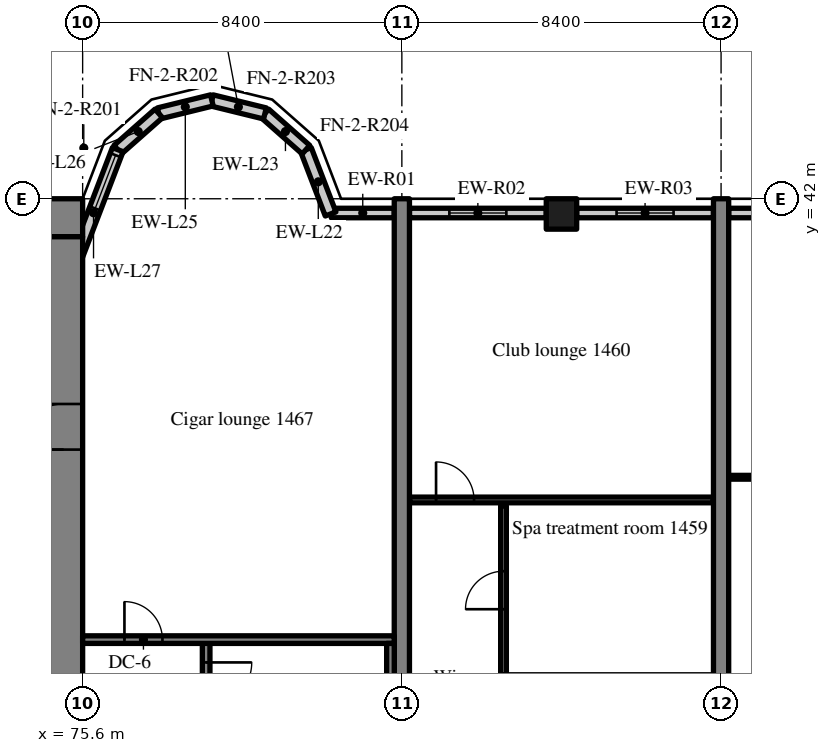
"""IFC4 building model, lengths in metres.
Left out: names, types, materials, properties, quantities, classifications, styles, units other than length and angle.
Written with IfcOpenShell. Run it as: python <this file> out.ifc"""

import sys

from ifc_helpers import new_model, si_unit, direction, frame, frame_2d, origin, origin_2d, place, context, subcontext, project, spatial, rectangle, extrude, source, transform, mapped, element, fill, save


model = new_model("IFC4")
c1 = context("Model", 3, precision=1e-05, world=origin(), true_north=direction((0.0, 1.0)))
c2 = subcontext(c1, "Body", "Model", "MODEL_VIEW")
j1 = project(units=[si_unit("LENGTHUNIT", "METRE"), si_unit("PLANEANGLEUNIT", "RADIAN")], contexts=[c1])
p1 = place(None, origin())
s1 = spatial("IfcSite", under=j1, at=p1, CompositionType="ELEMENT")
p2 = place(p1, origin())
s2 = spatial("IfcBuilding", under=s1, at=p2, CompositionType="ELEMENT")
p3 = place(p2, frame((0.0, 0.0, 62.0)))
s3 = spatial("IfcBuildingStorey", under=s2, at=p3, CompositionType="ELEMENT", Elevation=62.0)
m1 = source(origin(), c2, "Body", "SweptSolid", [
    extrude(rectangle(XDim=50.4, YDim=1.0, at=frame_2d((25.2, 0.0))), origin(), (0.0, 0.0, 1.0), 3.52),
])
p4 = place(p3, frame((25.2, 41.5, 0.0), z_axis=(0.0, 0.0, 1.0), x_axis=(1.0, 0.0, 0.0)))
e1 = element("IfcWall", 1, at=p4, inside=s3, PredefinedType="SHEAR", context=c2, shape_type="MappedRepresentation", body=[
    mapped(m1, transform((0.0, 0.0, 0.0), scale=1.0)),
])
m2 = source(origin(), c2, "Body", "SweptSolid", [
    extrude(rectangle(XDim=18.0, YDim=1.0, at=frame_2d((9.0, 0.0))), origin(), (0.0, 0.0, 1.0), 3.52),
])
p5 = place(p3, frame((75.1, 23.0, 0.0), z_axis=(0.0, 0.0, 1.0), x_axis=(0.0, 1.0, 0.0)))
e2 = element("IfcWall", 2, at=p5, inside=s3, PredefinedType="SHEAR", context=c2, shape_type="MappedRepresentation", body=[
    mapped(m2, transform((0.0, 0.0, 0.0), scale=1.0)),
])
m3 = source(origin(), c2, "Body", "SweptSolid", [
    extrude(rectangle(XDim=1.2, YDim=2.1, at=frame_2d((0.6, 1.05))), frame((0.0, 0.51, 0.0), z_axis=(0.0, -1.0, 0.0), x_axis=(1.0, 0.0, 0.0)), (0.0, 0.0, 1.0), 1.02),
])
p6 = place(p5, frame((12.4, 0.0, 0.0)))
e3 = element("IfcOpeningElement", 3, at=p6, cuts=e2, PredefinedType="OPENING", context=c2, shape_type="MappedRepresentation", body=[
    mapped(m3, transform((0.0, 0.0, 0.0), scale=1.0)),
])
m4 = source(origin(), c2, "Body", "SweptSolid", [
    extrude(rectangle(XDim=20.0, YDim=0.4, at=frame_2d((10.0, 0.0))), origin(), (0.0, 0.0, 1.0), 3.52),
])
for number, where, z_axis, x_axis in (
    (4, (84.0, 22.0, 0.0), (0.0, 0.0, 1.0), (0.0, 1.0, 0.0)),
    (5, (92.4, 22.0, 0.0), (0.0, 0.0, 1.0), (0.0, 1.0, 0.0)),
):
    element("IfcWall", number, at=place(p3, frame(where, z_axis=z_axis, x_axis=x_axis)), inside=s3, PredefinedType="SHEAR", context=c2, shape_type="MappedRepresentation", body=[
        mapped(m4, transform((0.0, 0.0, 0.0), scale=1.0)),
    ])
m5 = source(origin(), c2, "Body", "SweptSolid", [
    extrude(rectangle(XDim=0.8, YDim=0.8, at=origin_2d()), origin(), (0.0, 0.0, 1.0), 3.52),
])
p7 = place(p3, frame((88.2, 41.6, 0.0), z_axis=(0.0, 0.0, 1.0), x_axis=(1.0, 0.0, 0.0)))
e6 = element("IfcColumn", 6, at=p7, inside=s3, PredefinedType="COLUMN", context=c2, shape_type="MappedRepresentation", body=[
    mapped(m5, transform((0.0, 0.0, 0.0), scale=1.0)),
])
m6 = source(origin(), c2, "Body", "SweptSolid", [
    extrude(rectangle(XDim=1.658, YDim=0.25, at=frame_2d((0.829, 0.0))), origin(), (0.0, 0.0, 1.0), 2.82),
])
p8 = place(p3, frame((83.8, 41.625, 0.0), z_axis=(0.0, 0.0, 1.0), x_axis=(-1.0, 0.0, 0.0)))
e7 = element("IfcWall", 7, at=p8, inside=s3, PredefinedType="SOLIDWALL", context=c2, shape_type="MappedRepresentation", body=[
    mapped(m6, transform((0.0, 0.0, 0.0), scale=1.0)),
])
m7 = source(origin(), c2, "Body", "SweptSolid", [
    extrude(rectangle(XDim=3.6, YDim=0.25, at=frame_2d((1.8, 0.0))), origin(), (0.0, 0.0, 1.0), 2.82),
])
p9 = place(p3, frame((87.8, 41.625, 0.0), z_axis=(0.0, 0.0, 1.0), x_axis=(-1.0, 0.0, 0.0)))
e8 = element("IfcWall", 8, at=p9, inside=s3, PredefinedType="SOLIDWALL", context=c2, shape_type="MappedRepresentation", body=[
    mapped(m7, transform((0.0, 0.0, 0.0), scale=1.0)),
])
m8 = source(origin(), c2, "Body", "SweptSolid", [
    extrude(rectangle(XDim=1.5, YDim=1.5, at=frame_2d((0.75, 0.75))), frame((0.0, 0.135, 0.0), z_axis=(0.0, -1.0, 0.0), x_axis=(1.0, 0.0, 0.0)), (0.0, 0.0, 1.0), 0.27),
])
p10 = place(p9, frame((1.05, 0.0, 0.9)))
e9 = element("IfcOpeningElement", 9, at=p10, cuts=e8, PredefinedType="OPENING", context=c2, shape_type="MappedRepresentation", body=[
    mapped(m8, transform((0.0, 0.0, 0.0), scale=1.0)),
])
m9 = source(origin(), c2, "Body", "SweptSolid", [
    extrude(rectangle(XDim=3.6, YDim=0.25, at=frame_2d((1.8, 0.0))), origin(), (0.0, 0.0, 1.0), 2.82),
])
p11 = place(p3, frame((92.2, 41.625, 0.0), z_axis=(0.0, 0.0, 1.0), x_axis=(-1.0, 0.0, 0.0)))
e10 = element("IfcWall", 10, at=p11, inside=s3, PredefinedType="SOLIDWALL", context=c2, shape_type="MappedRepresentation", body=[
    mapped(m9, transform((0.0, 0.0, 0.0), scale=1.0)),
])
p12 = place(p11, frame((1.05, 0.0, 0.9)))
e11 = element("IfcOpeningElement", 11, at=p12, cuts=e10, PredefinedType="OPENING", context=c2, shape_type="MappedRepresentation", body=[
    mapped(m8, transform((0.0, 0.0, 0.0), scale=1.0)),
])
m10 = source(origin(), c2, "Body", "SweptSolid", [
    extrude(rectangle(XDim=4.045, YDim=0.25, at=frame_2d((2.022, 0.0))), origin(), (0.0, 0.0, 1.0), 2.82),
])
p13 = place(p3, frame((96.645, 41.625, 0.0), z_axis=(0.0, 0.0, 1.0), x_axis=(-1.0, 0.0, 0.0)))
e12 = element("IfcWall", 12, at=p13, inside=s3, PredefinedType="SOLIDWALL", context=c2, shape_type="MappedRepresentation", body=[
    mapped(m10, transform((0.0, 0.0, 0.0), scale=1.0)),
])
p14 = place(p13, frame((1.272, 0.0, 0.9)))
e13 = element("IfcOpeningElement", 13, at=p14, cuts=e12, PredefinedType="OPENING", context=c2, shape_type="MappedRepresentation", body=[
    mapped(m8, transform((0.0, 0.0, 0.0), scale=1.0)),
])
m11 = source(origin(), c2, "Body", "SweptSolid", [
    extrude(rectangle(XDim=1.812, YDim=0.3, at=frame_2d((0.906, 0.0))), origin(), (0.0, 0.0, 1.0), 3.52),
])
p15 = place(p3, frame((82.125, 41.6, 0.0), z_axis=(0.0, 0.0, 1.0), x_axis=(-0.357877270961, 0.93376863244, 0.0)))
e14 = element("IfcWall", 14, at=p15, inside=s3, PredefinedType="SOLIDWALL", context=c2, shape_type="MappedRepresentation", body=[
    mapped(m11, transform((0.0, 0.0, 0.0), scale=1.0)),
])
m12 = source(origin(), c2, "Body", "SweptSolid", [
    extrude(rectangle(XDim=1.44, YDim=0.3, at=frame_2d((0.72, 0.0))), origin(), (0.0, 0.0, 1.0), 3.52),
])
p16 = place(p3, frame((81.477, 43.292, 0.0), z_axis=(0.0, 0.0, 1.0), x_axis=(-0.74957555648, 0.661918790432, 0.0)))
e15 = element("IfcWall", 15, at=p16, inside=s3, PredefinedType="SOLIDWALL", context=c2, shape_type="MappedRepresentation", body=[
    mapped(m12, transform((0.0, 0.0, 0.0), scale=1.0)),
])
m13 = source(origin(), c2, "Body", "SweptSolid", [
    extrude(rectangle(XDim=1.439, YDim=0.3, at=frame_2d((0.719, 0.0))), origin(), (0.0, 0.0, 1.0), 3.52),
])
for number, where, z_axis, x_axis in (
    (16, (80.397, 44.245, 0.0), (0.0, 0.0, 1.0), (-0.971, 0.238, 0.0)),
    (17, (79.0, 44.588, 0.0), (0.0, 0.0, 1.0), (-0.971, -0.238, 0.0)),
):
    element("IfcWall", number, at=place(p3, frame(where, z_axis=z_axis, x_axis=x_axis)), inside=s3, PredefinedType="SOLIDWALL", context=c2, shape_type="MappedRepresentation", body=[
        mapped(m13, transform((0.0, 0.0, 0.0), scale=1.0)),
    ])
p17 = place(p3, frame((77.603, 44.245, 0.0), z_axis=(0.0, 0.0, 1.0), x_axis=(-0.74957555648, -0.661918790432, 0.0)))
e18 = element("IfcWall", 18, at=p17, inside=s3, PredefinedType="SOLIDWALL", context=c2, shape_type="MappedRepresentation", body=[
    mapped(m12, transform((0.0, 0.0, 0.0), scale=1.0)),
])
m14 = source(origin(), c2, "Body", "SweptSolid", [
    extrude(rectangle(XDim=3.559, YDim=0.3, at=frame_2d((1.78, 0.0))), origin(), (0.0, 0.0, 1.0), 3.52),
])
p18 = place(p3, frame((76.523, 43.292, 0.0), z_axis=(0.0, 0.0, 1.0), x_axis=(-0.35779745313, -0.933799219604, 0.0)))
e19 = element("IfcWall", 19, at=p18, inside=s3, PredefinedType="SOLIDWALL", context=c2, shape_type="MappedRepresentation", body=[
    mapped(m14, transform((0.0, 0.0, 0.0), scale=1.0)),
])
m15 = source(origin(), c2, "Body", "SweptSolid", [
    extrude(rectangle(XDim=1.5, YDim=2.0, at=frame_2d((0.75, 1.0))), frame((0.0, 0.16, 0.0), z_axis=(0.0, -1.0, 0.0), x_axis=(1.0, 0.0, 0.0)), (0.0, 0.0, 1.0), 0.32),
])
p19 = place(p18, frame((0.156, 0.0, 0.9)))
e20 = element("IfcOpeningElement", 20, at=p19, cuts=e19, PredefinedType="OPENING", context=c2, shape_type="MappedRepresentation", body=[
    mapped(m15, transform((0.0, 0.0, 0.0), scale=1.0)),
])
m16 = source(origin(), c2, "Body", "SweptSolid", [
    extrude(rectangle(XDim=8.3, YDim=0.2, at=frame_2d((4.15, 0.0))), origin(), (0.0, 0.0, 1.0), 3.52),
])
p20 = place(p3, frame((78.85, 22.1, 0.0), z_axis=(0.0, 0.0, 1.0), x_axis=(0.0, 1.0, 0.0)))
e21 = element("IfcWall", 21, at=p20, inside=s3, PredefinedType="SOLIDWALL", context=c2, shape_type="MappedRepresentation", body=[
    mapped(m16, transform((0.0, 0.0, 0.0), scale=1.0)),
])
m17 = source(origin(), c2, "Body", "SweptSolid", [
    extrude(rectangle(XDim=1.2, YDim=2.1, at=frame_2d((0.6, 1.05))), frame((0.0, 0.11, 0.0), z_axis=(0.0, -1.0, 0.0), x_axis=(1.0, 0.0, 0.0)), (0.0, 0.0, 1.0), 0.22),
])
p21 = place(p20, frame((6.5, 0.0, 0.0)))
e22 = element("IfcOpeningElement", 22, at=p21, cuts=e21, PredefinedType="OPENING", context=c2, shape_type="MappedRepresentation", body=[
    mapped(m17, transform((0.0, 0.0, 0.0), scale=1.0)),
])
m18 = source(origin(), c2, "Body", "SweptSolid", [
    extrude(rectangle(XDim=8.2, YDim=0.2, at=frame_2d((4.1, 0.0))), origin(), (0.0, 0.0, 1.0), 3.52),
])
p22 = place(p3, frame((83.8, 30.4, 0.0), z_axis=(0.0, 0.0, 1.0), x_axis=(-1.0, 0.0, 0.0)))
e23 = element("IfcWall", 23, at=p22, inside=s3, PredefinedType="SOLIDWALL", context=c2, shape_type="MappedRepresentation", body=[
    mapped(m18, transform((0.0, 0.0, 0.0), scale=1.0)),
])
m19 = source(origin(), c2, "Body", "SweptSolid", [
    extrude(rectangle(XDim=1.0, YDim=2.1, at=frame_2d((0.5, 1.05))), frame((0.0, 0.11, 0.0), z_axis=(0.0, -1.0, 0.0), x_axis=(1.0, 0.0, 0.0)), (0.0, 0.0, 1.0), 0.22),
])
p23 = place(p22, frame((6.1, 0.0, 0.0)))
e24 = element("IfcOpeningElement", 24, at=p23, cuts=e23, PredefinedType="OPENING", context=c2, shape_type="MappedRepresentation", body=[
    mapped(m19, transform((0.0, 0.0, 0.0), scale=1.0)),
])
m20 = source(origin(), c2, "Body", "SweptSolid", [
    extrude(rectangle(XDim=8.1, YDim=0.2, at=frame_2d((4.05, 0.0))), origin(), (0.0, 0.0, 1.0), 3.52),
])
p24 = place(p3, frame((83.7, 22.2, 0.0), z_axis=(0.0, 0.0, 1.0), x_axis=(0.0, 1.0, 0.0)))
e25 = element("IfcWall", 25, at=p24, inside=s3, PredefinedType="SOLIDWALL", context=c2, shape_type="MappedRepresentation", body=[
    mapped(m20, transform((0.0, 0.0, 0.0), scale=1.0)),
])
m21 = source(origin(), c2, "Body", "SweptSolid", [
    extrude(rectangle(XDim=4.45, YDim=0.15, at=frame_2d((2.225, 0.0))), origin(), (0.0, 0.0, 1.0), 3.52),
])
p25 = place(p3, frame((86.675, 29.475, 0.0), z_axis=(0.0, 0.0, 1.0), x_axis=(0.0, 1.0, 0.0)))
e26 = element("IfcWall", 26, at=p25, inside=s3, PredefinedType="PARTITIONING", context=c2, shape_type="MappedRepresentation", body=[
    mapped(m21, transform((0.0, 0.0, 0.0), scale=1.0)),
])
m22 = source(origin(), c2, "Body", "SweptSolid", [
    extrude(rectangle(XDim=1.0, YDim=2.1, at=frame_2d((0.5, 1.05))), frame((0.0, 0.085, 0.0), z_axis=(0.0, -1.0, 0.0), x_axis=(1.0, 0.0, 0.0)), (0.0, 0.0, 1.0), 0.17),
])
p26 = place(p25, frame((1.725, 0.0, 0.0)))
e27 = element("IfcOpeningElement", 27, at=p26, cuts=e26, PredefinedType="OPENING", context=c2, shape_type="MappedRepresentation", body=[
    mapped(m22, transform((0.0, 0.0, 0.0), scale=1.0)),
])
m23 = source(origin(), c2, "Body", "SweptSolid", [
    extrude(rectangle(XDim=8.0, YDim=0.15, at=frame_2d((4.0, 0.0))), origin(), (0.0, 0.0, 1.0), 3.52),
])
p27 = place(p3, frame((84.2, 34.075, 0.0), z_axis=(0.0, 0.0, 1.0), x_axis=(1.0, 0.0, 0.0)))
e28 = element("IfcWall", 28, at=p27, inside=s3, PredefinedType="PARTITIONING", context=c2, shape_type="MappedRepresentation", body=[
    mapped(m23, transform((0.0, 0.0, 0.0), scale=1.0)),
])
p28 = place(p27, frame((0.7, 0.0, 0.0)))
e29 = element("IfcOpeningElement", 29, at=p28, cuts=e28, PredefinedType="OPENING", context=c2, shape_type="MappedRepresentation", body=[
    mapped(m22, transform((0.0, 0.0, 0.0), scale=1.0)),
])
m24 = source(origin(), c2, "Body", "SweptSolid", [
    extrude(rectangle(XDim=7.8, YDim=0.1, at=frame_2d((3.9, 0.0))), origin(), (0.0, 0.0, 1.0), 3.52),
])
p29 = place(p3, frame((92.6, 34.672, 0.0), z_axis=(0.0, 0.0, 1.0), x_axis=(1.0, 0.0, 0.0)))
e30 = element("IfcWall", 30, at=p29, inside=s3, PredefinedType="PARTITIONING", context=c2, shape_type="MappedRepresentation", body=[
    mapped(m24, transform((0.0, 0.0, 0.0), scale=1.0)),
])
m25 = source(origin(), c2, "Body", "SweptSolid", [
    extrude(rectangle(XDim=1.8, YDim=2.1, at=frame_2d((0.9, 1.05))), frame((0.0, 0.06, 0.0), z_axis=(0.0, -1.0, 0.0), x_axis=(1.0, 0.0, 0.0)), (0.0, 0.0, 1.0), 0.12),
])
p30 = place(p29, frame((3.0, 0.0, 0.0)))
e31 = element("IfcOpeningElement", 31, at=p30, cuts=e30, PredefinedType="OPENING", context=c2, shape_type="MappedRepresentation", body=[
    mapped(m25, transform((0.0, 0.0, 0.0), scale=1.0)),
])
m26 = source(origin(), c2, "Body", "SweptSolid", [
    extrude(rectangle(XDim=1.5, YDim=1.5, at=frame_2d((0.75, 0.75))), frame((0.0, 0.03, 0.0), z_axis=(0.0, -1.0, 0.0), x_axis=(1.0, 0.0, 0.0)), (0.0, 0.0, 1.0), 0.06),
])
p31 = place(p10, origin())
e32 = element("IfcWindow", 32, at=p31, inside=s3, PartitioningType="SINGLE_PANEL", PredefinedType="WINDOW", context=c2, shape_type="MappedRepresentation", body=[
    mapped(m26, transform((0.0, 0.0, 0.0), scale=1.0)),
])
fill(e9, e32)
p32 = place(p12, origin())
e33 = element("IfcWindow", 33, at=p32, inside=s3, PartitioningType="SINGLE_PANEL", PredefinedType="WINDOW", context=c2, shape_type="MappedRepresentation", body=[
    mapped(m26, transform((0.0, 0.0, 0.0), scale=1.0)),
])
fill(e11, e33)
m27 = source(origin(), c2, "Body", "SweptSolid", [
    extrude(rectangle(XDim=1.5, YDim=2.0, at=frame_2d((0.75, 1.0))), frame((0.0, 0.03, 0.0), z_axis=(0.0, -1.0, 0.0), x_axis=(1.0, 0.0, 0.0)), (0.0, 0.0, 1.0), 0.06),
])
p33 = place(p19, origin())
e34 = element("IfcWindow", 34, at=p33, inside=s3, PartitioningType="SINGLE_PANEL", PredefinedType="WINDOW", context=c2, shape_type="MappedRepresentation", body=[
    mapped(m27, transform((0.0, 0.0, 0.0), scale=1.0)),
])
fill(e20, e34)
m28 = source(origin(), c2, "Body", "SweptSolid", [
    extrude(rectangle(XDim=1.2, YDim=2.1, at=frame_2d((0.6, 1.05))), frame((0.0, 0.025, 0.0), z_axis=(0.0, -1.0, 0.0), x_axis=(1.0, 0.0, 0.0)), (0.0, 0.0, 1.0), 0.05),
])
p34 = place(p6, origin())
e35 = element("IfcDoor", 35, at=p34, inside=s3, OperationType="SINGLE_SWING_LEFT", PredefinedType="DOOR", context=c2, shape_type="MappedRepresentation", body=[
    mapped(m28, transform((0.0, 0.0, 0.0), scale=1.0)),
])
fill(e3, e35)
p35 = place(p21, origin())
e36 = element("IfcDoor", 36, at=p35, inside=s3, OperationType="SINGLE_SWING_RIGHT", PredefinedType="DOOR", context=c2, shape_type="MappedRepresentation", body=[
    mapped(m28, transform((0.0, 0.0, 0.0), scale=1.0)),
])
fill(e22, e36)
m29 = source(origin(), c2, "Body", "SweptSolid", [
    extrude(rectangle(XDim=1.0, YDim=2.1, at=frame_2d((0.5, 1.05))), frame((0.0, 0.025, 0.0), z_axis=(0.0, -1.0, 0.0), x_axis=(1.0, 0.0, 0.0)), (0.0, 0.0, 1.0), 0.05),
])
p36 = place(p23, origin())
e37 = element("IfcDoor", 37, at=p36, inside=s3, OperationType="SINGLE_SWING_RIGHT", PredefinedType="DOOR", context=c2, shape_type="MappedRepresentation", body=[
    mapped(m29, transform((0.0, 0.0, 0.0), scale=1.0)),
])
fill(e24, e37)
p37 = place(p26, origin())
e38 = element("IfcDoor", 38, at=p37, inside=s3, OperationType="SINGLE_SWING_LEFT", PredefinedType="DOOR", context=c2, shape_type="MappedRepresentation", body=[
    mapped(m29, transform((0.0, 0.0, 0.0), scale=1.0)),
])
fill(e27, e38)
p38 = place(p28, origin())
e39 = element("IfcDoor", 39, at=p38, inside=s3, OperationType="SINGLE_SWING_LEFT", PredefinedType="DOOR", context=c2, shape_type="MappedRepresentation", body=[
    mapped(m29, transform((0.0, 0.0, 0.0), scale=1.0)),
])
fill(e29, e39)
save(model, sys.argv[1])
